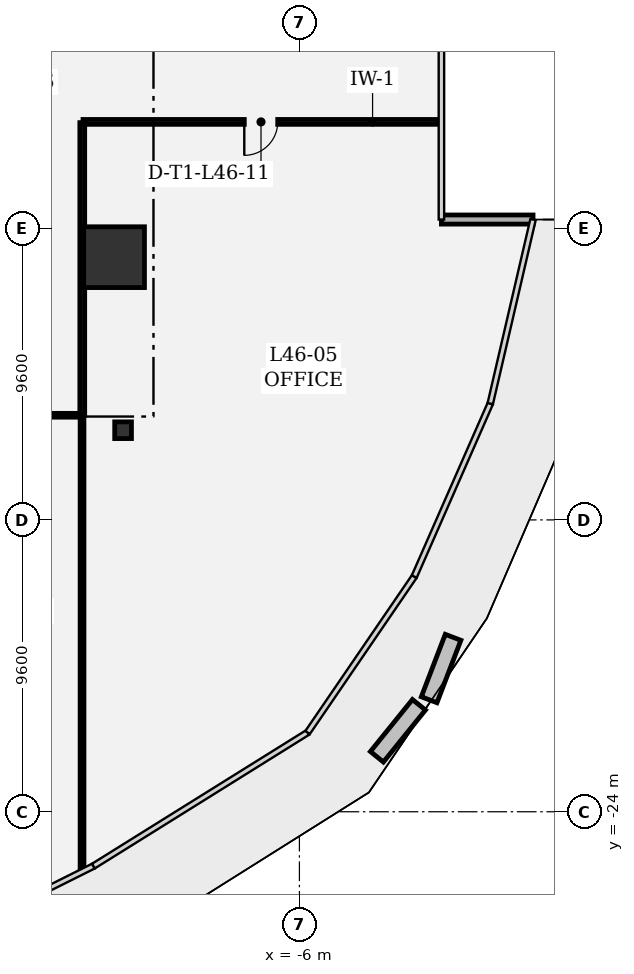
"""IFC4 building model, lengths in metres.
Left out: names, types, materials, properties, quantities, classifications, styles, units other than length and angle.
Written with IfcOpenShell. Run it as: python <this file> out.ifc"""

import sys

from ifc_helpers import new_model, si_unit, direction, frame, frame_2d, origin, origin_2d, place, context, subcontext, project, spatial, rectangle, extrude, element, fill, save


model = new_model("IFC4")
c1 = context("Model", 3, precision=1e-05, world=origin(), true_north=direction((0.0, 1.0)))
c2 = subcontext(c1, "Body", "Model", "MODEL_VIEW")
j1 = project(units=[si_unit("LENGTHUNIT", "METRE"), si_unit("PLANEANGLEUNIT", "RADIAN")], contexts=[c1])
p1 = place(None, origin())
s1 = spatial("IfcSite", under=j1, at=p1, CompositionType="ELEMENT")
p2 = place(p1, origin())
s2 = spatial("IfcBuilding", under=s1, at=p2, CompositionType="ELEMENT")
p3 = place(p2, frame((0.0, 0.0, 201.0)))
s3 = spatial("IfcBuildingStorey", under=s2, at=p3, CompositionType="ELEMENT", Elevation=201.0)
p4 = place(p3, frame((-12.097, -5.758, 0.0), z_axis=(0.0, 0.0, 1.0), x_axis=(1.0, 0.0, 0.0)))
e1 = element("IfcColumn", 1, at=p4, inside=s3, PredefinedType="COLUMN", context=c2, shape_type="SweptSolid", body=[
    extrude(rectangle(XDim=2.0, YDim=2.0, at=origin_2d()), origin(), (0.0, 0.0, 1.0), 4.05),
])
p5 = place(p3, frame((-11.8, -11.45, 0.0), z_axis=(0.0, 0.0, 1.0), x_axis=(1.0, 0.0, 0.0)))
e2 = element("IfcColumn", 2, at=p5, inside=s3, PredefinedType="COLUMN", context=c2, shape_type="SweptSolid", body=[
    extrude(rectangle(XDim=0.55, YDim=0.55, at=origin_2d()), origin(), (0.0, 0.0, 1.0), 4.05),
])
p6 = place(p3, frame((1.684, -4.52, 0.0), z_axis=(0.0, 0.0, 1.0), x_axis=(-1.0, 0.0, 0.0)))
e3 = element("IfcWall", 3, at=p6, inside=s3, PredefinedType="SOLIDWALL", context=c2, shape_type="SweptSolid", body=[
    extrude(rectangle(XDim=3.013, YDim=0.3, at=frame_2d((1.507, 0.0))), origin(), (0.0, 0.0, 1.0), 3.78),
])
p7 = place(p3, frame((-13.15, -25.895, 0.0), z_axis=(0.0, 0.0, 1.0), x_axis=(0.0, 1.0, 0.0)))
e4 = element("IfcWall", 4, at=p7, inside=s3, PredefinedType="PARTITIONING", context=c2, shape_type="SweptSolid", body=[
    extrude(rectangle(XDim=14.912, YDim=0.125, at=frame_2d((7.456, 0.0))), origin(), (0.0, 0.0, 1.0), 3.78),
])
p8 = place(p3, frame((-13.175, -10.958, 0.0), z_axis=(0.0, 0.0, 1.0), x_axis=(-1.0, 0.0, 0.0)))
e5 = element("IfcWall", 5, at=p8, inside=s3, PredefinedType="PARTITIONING", context=c2, shape_type="SweptSolid", body=[
    extrude(rectangle(XDim=21.442, YDim=0.125, at=frame_2d((10.721, 0.0))), origin(), (0.0, 0.0, 1.0), 2.9),
])
p9 = place(p8, frame((8.782, 0.0, 0.0)))
e6 = element("IfcOpeningElement", 6, at=p9, cuts=e5, PredefinedType="OPENING", context=c2, shape_type="SweptSolid", body=[
    extrude(rectangle(XDim=0.95, YDim=2.15, at=frame_2d((0.475, 1.075))), frame((0.0, 0.073, 0.0), z_axis=(0.0, -1.0, 0.0), x_axis=(1.0, 0.0, 0.0)), (0.0, 0.0, 1.0), 0.145),
])
p10 = place(p3, frame((-1.409, -1.308, 0.0), z_axis=(0.0, 0.0, 1.0), x_axis=(-1.0, 0.0, 0.0)))
e7 = element("IfcWall", 7, at=p10, inside=s3, PredefinedType="PARTITIONING", context=c2, shape_type="SweptSolid", body=[
    extrude(rectangle(XDim=11.708, YDim=0.16, at=frame_2d((5.854, 0.0))), origin(), (0.0, 0.0, 1.0), 3.78),
])
p11 = place(p10, frame((5.304, 0.0, 0.0)))
e8 = element("IfcOpeningElement", 8, at=p11, cuts=e7, PredefinedType="OPENING", context=c2, shape_type="SweptSolid", body=[
    extrude(rectangle(XDim=1.1, YDim=2.15, at=frame_2d((0.55, 1.075))), frame((0.0, 0.09, 0.0), z_axis=(0.0, -1.0, 0.0), x_axis=(1.0, 0.0, 0.0)), (0.0, 0.0, 1.0), 0.18),
])
p12 = place(p3, frame((-13.142, -1.333, 0.0), z_axis=(0.0, 0.0, 1.0), x_axis=(0.0, -1.0, 0.0)))
e9 = element("IfcWall", 9, at=p12, inside=s3, PredefinedType="PARTITIONING", context=c2, shape_type="SweptSolid", body=[
    extrude(rectangle(XDim=9.625, YDim=0.16, at=frame_2d((4.812, 0.0))), origin(), (0.0, 0.0, 1.0), 2.9),
])
p13 = place(p11, origin())
e10 = element("IfcDoor", 10, at=p13, inside=s3, OperationType="SINGLE_SWING_RIGHT", PredefinedType="DOOR", context=c2, shape_type="SweptSolid", body=[
    extrude(rectangle(XDim=1.1, YDim=2.15, at=frame_2d((0.55, 1.075))), frame((0.0, 0.025, 0.0), z_axis=(0.0, -1.0, 0.0), x_axis=(1.0, 0.0, 0.0)), (0.0, 0.0, 1.0), 0.05),
])
fill(e8, e10)
save(model, sys.argv[1])
